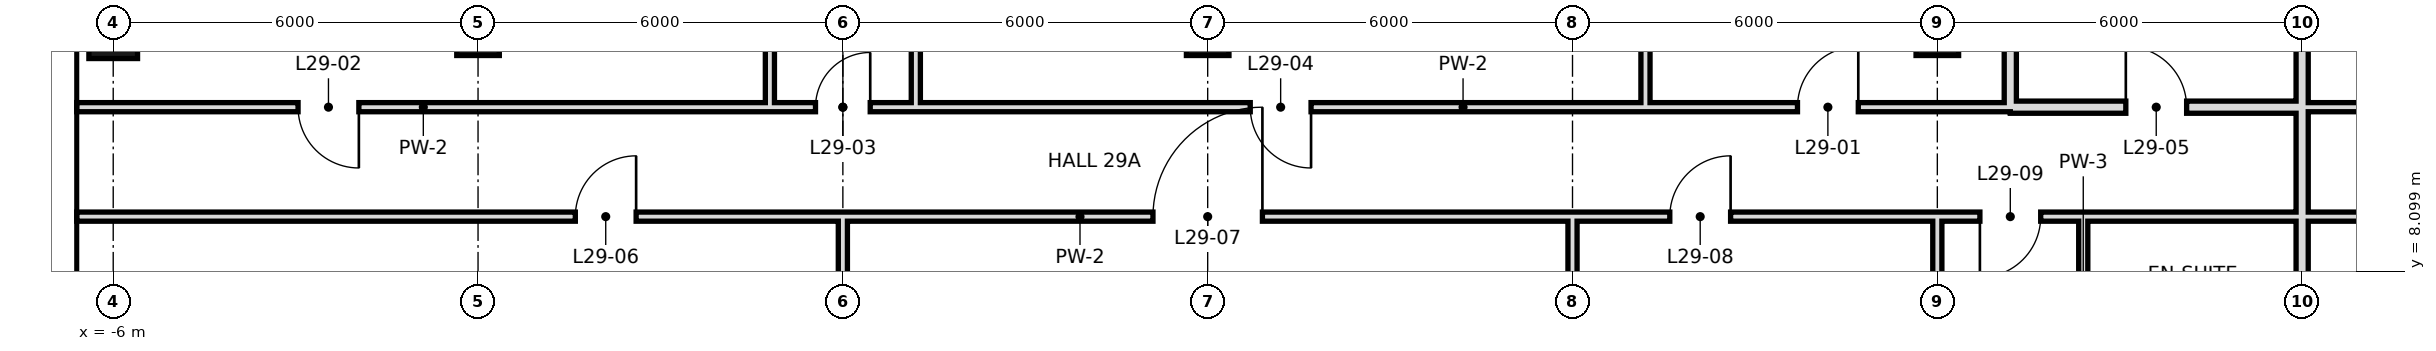
"""IFC4 building model, lengths in metres.
Left out: names, types, materials, properties, quantities, classifications, styles, units other than length and angle.
Written with IfcOpenShell. Run it as: python <this file> out.ifc"""

import sys

from ifc_helpers import new_model, si_unit, direction, frame, frame_2d, origin, origin_2d, place, context, subcontext, project, spatial, rectangle, hollow_rectangle, extrude, element, fill, save


model = new_model("IFC4")
c1 = context("Model", 3, precision=1e-05, world=origin(), true_north=direction((0.0, 1.0)))
c2 = subcontext(c1, "Body", "Model", "MODEL_VIEW")
j1 = project(units=[si_unit("LENGTHUNIT", "METRE"), si_unit("PLANEANGLEUNIT", "RADIAN")], contexts=[c1])
p1 = place(None, origin())
s1 = spatial("IfcSite", under=j1, at=p1, CompositionType="ELEMENT")
p2 = place(p1, origin())
s2 = spatial("IfcBuilding", under=s1, at=p2, CompositionType="ELEMENT")
p3 = place(p2, frame((0.0, 0.0, 130.4)))
s3 = spatial("IfcBuildingStorey", under=s2, at=p3, CompositionType="ELEMENT", Elevation=130.4)
p4 = place(p3, frame((-6.0, 12.0, 0.0), z_axis=(0.0, 0.0, 1.0), x_axis=(1.0, 0.0, 0.0)))
e1 = element("IfcColumn", 1, at=p4, inside=s3, PredefinedType="COLUMN", context=c2, shape_type="SweptSolid", body=[
    extrude(hollow_rectangle(XDim=0.8, YDim=0.8, WallThickness=0.04, at=origin_2d()), origin(), (0.0, 0.0, 1.0), 3.6),
])
for number, where, z_axis, x_axis in (
    (2, (0.0, 12.0, 0.0), (0.0, 0.0, 1.0), (1.0, 0.0, 0.0)),
    (3, (12.0, 12.0, 0.0), (0.0, 0.0, 1.0), (1.0, 0.0, 0.0)),
    (4, (24.0, 12.0, 0.0), (0.0, 0.0, 1.0), (1.0, 0.0, 0.0)),
):
    element("IfcColumn", number, at=place(p3, frame(where, z_axis=z_axis, x_axis=x_axis)), inside=s3, PredefinedType="COLUMN", context=c2, shape_type="SweptSolid", body=[
        extrude(hollow_rectangle(XDim=0.7, YDim=0.7, WallThickness=0.036, at=origin_2d()), origin(), (0.0, 0.0, 1.0), 3.6),
    ])
p5 = place(p3, frame((18.0, -0.6, 0.0), z_axis=(0.0, 0.0, 1.0), x_axis=(0.0, 1.0, 0.0)))
e5 = element("IfcWall", 5, at=p5, inside=s3, PredefinedType="PARTITIONING", context=c2, shape_type="SweptSolid", body=[
    extrude(rectangle(XDim=9.6, YDim=0.15, at=frame_2d((4.8, 0.0))), origin(), (0.0, 0.0, 1.0), 2.72),
])
p6 = place(p3, frame((19.2, 10.8, 0.0), z_axis=(0.0, 0.0, 1.0), x_axis=(0.0, 1.0, 0.0)))
e6 = element("IfcWall", 6, at=p6, inside=s3, PredefinedType="PARTITIONING", context=c2, shape_type="SweptSolid", body=[
    extrude(rectangle(XDim=7.9, YDim=0.15, at=frame_2d((3.95, 0.0))), origin(), (0.0, 0.0, 1.0), 3.42),
])
p7 = place(p3, frame((24.0, 0.0, 0.0), z_axis=(0.0, 0.0, 1.0), x_axis=(0.0, 1.0, 0.0)))
e7 = element("IfcWall", 7, at=p7, inside=s3, PredefinedType="PARTITIONING", context=c2, shape_type="SweptSolid", body=[
    extrude(rectangle(XDim=9.0, YDim=0.15, at=frame_2d((4.5, 0.0))), origin(), (0.0, 0.0, 1.0), 2.72),
])
p8 = place(p3, frame((25.2, 10.8, 0.0), z_axis=(0.0, 0.0, 1.0), x_axis=(0.0, 1.0, 0.0)))
e8 = element("IfcWall", 8, at=p8, inside=s3, PredefinedType="SOLIDWALL", context=c2, shape_type="SweptSolid", body=[
    extrude(rectangle(XDim=7.9, YDim=0.2, at=frame_2d((3.95, 0.0))), origin(), (0.0, 0.0, 1.0), 2.72),
])
p9 = place(p3, frame((26.4, 6.0, 0.0), z_axis=(0.0, 0.0, 1.0), x_axis=(0.0, 1.0, 0.0)))
e9 = element("IfcWall", 9, at=p9, inside=s3, PredefinedType="PARTITIONING", context=c2, shape_type="SweptSolid", body=[
    extrude(rectangle(XDim=3.0, YDim=0.15, at=frame_2d((1.5, 0.0))), origin(), (0.0, 0.0, 1.0), 3.42),
])
p10 = place(p3, frame((30.0, 10.8, 0.0), z_axis=(0.0, 0.0, 1.0), x_axis=(0.0, 1.0, 0.0)))
e10 = element("IfcWall", 10, at=p10, inside=s3, PredefinedType="SOLIDWALL", context=c2, shape_type="SweptSolid", body=[
    extrude(rectangle(XDim=7.9, YDim=0.2, at=frame_2d((3.95, 0.0))), origin(), (0.0, 0.0, 1.0), 2.72),
])
p11 = place(p3, frame((30.0, -0.6, 0.0), z_axis=(0.0, 0.0, 1.0), x_axis=(0.0, 1.0, 0.0)))
e11 = element("IfcWall", 11, at=p11, inside=s3, PredefinedType="SOLIDWALL", context=c2, shape_type="SweptSolid", body=[
    extrude(rectangle(XDim=11.4, YDim=0.2, at=frame_2d((5.7, 0.0))), origin(), (0.0, 0.0, 1.0), 2.72),
])
p12 = place(p3, frame((4.8, 10.8, 0.0), z_axis=(0.0, 0.0, 1.0), x_axis=(0.0, 1.0, 0.0)))
e12 = element("IfcWall", 12, at=p12, inside=s3, PredefinedType="PARTITIONING", context=c2, shape_type="SweptSolid", body=[
    extrude(rectangle(XDim=7.9, YDim=0.15, at=frame_2d((3.95, 0.0))), origin(), (0.0, 0.0, 1.0), 3.42),
])
p13 = place(p3, frame((6.0, -0.6, 0.0), z_axis=(0.0, 0.0, 1.0), x_axis=(0.0, 1.0, 0.0)))
e13 = element("IfcWall", 13, at=p13, inside=s3, PredefinedType="PARTITIONING", context=c2, shape_type="SweptSolid", body=[
    extrude(rectangle(XDim=9.6, YDim=0.15, at=frame_2d((4.8, 0.0))), origin(), (0.0, 0.0, 1.0), 2.72),
])
p14 = place(p3, frame((7.2, 10.8, 0.0), z_axis=(0.0, 0.0, 1.0), x_axis=(0.0, 1.0, 0.0)))
e14 = element("IfcWall", 14, at=p14, inside=s3, PredefinedType="PARTITIONING", context=c2, shape_type="SweptSolid", body=[
    extrude(rectangle(XDim=7.9, YDim=0.15, at=frame_2d((3.95, 0.0))), origin(), (0.0, 0.0, 1.0), 3.42),
])
p15 = place(p3, frame((25.2, 10.8, 0.0), z_axis=(0.0, 0.0, 1.0), x_axis=(1.0, 0.0, 0.0)))
e15 = element("IfcWall", 15, at=p15, inside=s3, PredefinedType="SOLIDWALL", context=c2, shape_type="SweptSolid", body=[
    extrude(rectangle(XDim=4.8, YDim=0.2, at=frame_2d((2.4, 0.0))), origin(), (0.0, 0.0, 1.0), 2.72),
])
p16 = place(p15, frame((1.9, 0.0, 0.0)))
e16 = element("IfcOpeningElement", 16, at=p16, cuts=e15, PredefinedType="OPENING", context=c2, shape_type="SweptSolid", body=[
    extrude(rectangle(XDim=1.0, YDim=2.4, at=frame_2d((0.5, 1.2))), frame((0.0, 0.11, 0.0), z_axis=(0.0, -1.0, 0.0), x_axis=(1.0, 0.0, 0.0)), (0.0, 0.0, 1.0), 0.22),
])
p17 = place(p3, frame((-6.6, 10.8, 0.0), z_axis=(0.0, 0.0, 1.0), x_axis=(1.0, 0.0, 0.0)))
e17 = element("IfcWall", 17, at=p17, inside=s3, PredefinedType="PARTITIONING", context=c2, shape_type="SweptSolid", body=[
    extrude(rectangle(XDim=11.4, YDim=0.15, at=frame_2d((5.7, 0.0))), origin(), (0.0, 0.0, 1.0), 3.42),
])
p18 = place(p17, frame((3.64, 0.0, 0.0)))
e18 = element("IfcOpeningElement", 18, at=p18, cuts=e17, PredefinedType="OPENING", context=c2, shape_type="SweptSolid", body=[
    extrude(rectangle(XDim=1.0, YDim=2.4, at=frame_2d((0.5, 1.2))), frame((0.0, 0.085, 0.0), z_axis=(0.0, -1.0, 0.0), x_axis=(1.0, 0.0, 0.0)), (0.0, 0.0, 1.0), 0.17),
])
p19 = place(p3, frame((7.2, 10.8, 0.0), z_axis=(0.0, 0.0, 1.0), x_axis=(1.0, 0.0, 0.0)))
e19 = element("IfcWall", 19, at=p19, inside=s3, PredefinedType="PARTITIONING", context=c2, shape_type="SweptSolid", body=[
    extrude(rectangle(XDim=18.0, YDim=0.15, at=frame_2d((9.0, 0.0))), origin(), (0.0, 0.0, 1.0), 3.42),
])
p20 = place(p19, frame((14.5, 0.0, 0.0)))
e20 = element("IfcOpeningElement", 20, at=p20, cuts=e19, PredefinedType="OPENING", context=c2, shape_type="SweptSolid", body=[
    extrude(rectangle(XDim=1.0, YDim=2.4, at=frame_2d((0.5, 1.2))), frame((0.0, 0.085, 0.0), z_axis=(0.0, -1.0, 0.0), x_axis=(1.0, 0.0, 0.0)), (0.0, 0.0, 1.0), 0.17),
])
p21 = place(p19, frame((5.5, 0.0, 0.0)))
e21 = element("IfcOpeningElement", 21, at=p21, cuts=e19, PredefinedType="OPENING", context=c2, shape_type="SweptSolid", body=[
    extrude(rectangle(XDim=1.0, YDim=2.4, at=frame_2d((0.5, 1.2))), frame((0.0, 0.085, 0.0), z_axis=(0.0, -1.0, 0.0), x_axis=(1.0, 0.0, 0.0)), (0.0, 0.0, 1.0), 0.17),
])
p22 = place(p3, frame((30.0, 10.8, 0.0), z_axis=(0.0, 0.0, 1.0), x_axis=(1.0, 0.0, 0.0)))
e22 = element("IfcWall", 22, at=p22, inside=s3, PredefinedType="PARTITIONING", context=c2, shape_type="SweptSolid", body=[
    extrude(rectangle(XDim=11.4, YDim=0.15, at=frame_2d((5.7, 0.0))), origin(), (0.0, 0.0, 1.0), 3.42),
])
p23 = place(p22, frame((9.1, 0.0, 0.0)))
e23 = element("IfcOpeningElement", 23, at=p23, cuts=e22, PredefinedType="OPENING", context=c2, shape_type="SweptSolid", body=[
    extrude(rectangle(XDim=1.0, YDim=2.4, at=frame_2d((0.5, 1.2))), frame((0.0, 0.085, 0.0), z_axis=(0.0, -1.0, 0.0), x_axis=(1.0, 0.0, 0.0)), (0.0, 0.0, 1.0), 0.17),
])
p24 = place(p22, frame((3.4, 0.0, 0.0)))
e24 = element("IfcOpeningElement", 24, at=p24, cuts=e22, PredefinedType="OPENING", context=c2, shape_type="SweptSolid", body=[
    extrude(rectangle(XDim=1.0, YDim=2.4, at=frame_2d((0.5, 1.2))), frame((0.0, 0.085, 0.0), z_axis=(0.0, -1.0, 0.0), x_axis=(1.0, 0.0, 0.0)), (0.0, 0.0, 1.0), 0.17),
])
p25 = place(p3, frame((4.8, 10.8, 0.0), z_axis=(0.0, 0.0, 1.0), x_axis=(1.0, 0.0, 0.0)))
e25 = element("IfcWall", 25, at=p25, inside=s3, PredefinedType="PARTITIONING", context=c2, shape_type="SweptSolid", body=[
    extrude(rectangle(XDim=2.4, YDim=0.15, at=frame_2d((1.2, 0.0))), origin(), (0.0, 0.0, 1.0), 3.42),
])
p26 = place(p25, frame((0.75, 0.0, 0.0)))
e26 = element("IfcOpeningElement", 26, at=p26, cuts=e25, PredefinedType="OPENING", context=c2, shape_type="SweptSolid", body=[
    extrude(rectangle(XDim=0.9, YDim=2.4, at=frame_2d((0.45, 1.2))), frame((0.0, 0.085, 0.0), z_axis=(0.0, -1.0, 0.0), x_axis=(1.0, 0.0, 0.0)), (0.0, 0.0, 1.0), 0.17),
])
p27 = place(p3, frame((-6.6, 9.0, 0.0), z_axis=(0.0, 0.0, 1.0), x_axis=(1.0, 0.0, 0.0)))
e27 = element("IfcWall", 27, at=p27, inside=s3, PredefinedType="PARTITIONING", context=c2, shape_type="SweptSolid", body=[
    extrude(rectangle(XDim=33.0, YDim=0.15, at=frame_2d((16.5, 0.0))), origin(), (0.0, 0.0, 1.0), 3.42),
])
p28 = place(p27, frame((8.2, 0.0, 0.0)))
e28 = element("IfcOpeningElement", 28, at=p28, cuts=e27, PredefinedType="OPENING", context=c2, shape_type="SweptSolid", body=[
    extrude(rectangle(XDim=1.0, YDim=2.4, at=frame_2d((0.5, 1.2))), frame((0.0, 0.085, 0.0), z_axis=(0.0, -1.0, 0.0), x_axis=(1.0, 0.0, 0.0)), (0.0, 0.0, 1.0), 0.17),
])
p29 = place(p27, frame((17.7, 0.0, 0.0)))
e29 = element("IfcOpeningElement", 29, at=p29, cuts=e27, PredefinedType="OPENING", context=c2, shape_type="SweptSolid", body=[
    extrude(rectangle(XDim=1.8, YDim=2.4, at=frame_2d((0.9, 1.2))), frame((0.0, 0.085, 0.0), z_axis=(0.0, -1.0, 0.0), x_axis=(1.0, 0.0, 0.0)), (0.0, 0.0, 1.0), 0.17),
])
p30 = place(p27, frame((26.2, 0.0, 0.0)))
e30 = element("IfcOpeningElement", 30, at=p30, cuts=e27, PredefinedType="OPENING", context=c2, shape_type="SweptSolid", body=[
    extrude(rectangle(XDim=1.0, YDim=2.4, at=frame_2d((0.5, 1.2))), frame((0.0, 0.085, 0.0), z_axis=(0.0, -1.0, 0.0), x_axis=(1.0, 0.0, 0.0)), (0.0, 0.0, 1.0), 0.17),
])
p31 = place(p27, frame((31.3, 0.0, 0.0)))
e31 = element("IfcOpeningElement", 31, at=p31, cuts=e27, PredefinedType="OPENING", context=c2, shape_type="SweptSolid", body=[
    extrude(rectangle(XDim=1.0, YDim=2.4, at=frame_2d((0.5, 1.2))), frame((0.0, 0.085, 0.0), z_axis=(0.0, -1.0, 0.0), x_axis=(1.0, 0.0, 0.0)), (0.0, 0.0, 1.0), 0.17),
])
p32 = place(p3, frame((30.0, 9.0, 0.0), z_axis=(0.0, 0.0, 1.0), x_axis=(1.0, 0.0, 0.0)))
e32 = element("IfcWall", 32, at=p32, inside=s3, PredefinedType="PARTITIONING", context=c2, shape_type="SweptSolid", body=[
    extrude(rectangle(XDim=18.0, YDim=0.15, at=frame_2d((9.0, 0.0))), origin(), (0.0, 0.0, 1.0), 3.42),
])
p33 = place(p32, frame((7.04, 0.0, 0.0)))
e33 = element("IfcOpeningElement", 33, at=p33, cuts=e32, PredefinedType="OPENING", context=c2, shape_type="SweptSolid", body=[
    extrude(rectangle(XDim=1.8, YDim=2.4, at=frame_2d((0.9, 1.2))), frame((0.0, 0.085, 0.0), z_axis=(0.0, -1.0, 0.0), x_axis=(1.0, 0.0, 0.0)), (0.0, 0.0, 1.0), 0.17),
])
p34 = place(p32, frame((15.4, 0.0, 0.0)))
e34 = element("IfcOpeningElement", 34, at=p34, cuts=e32, PredefinedType="OPENING", context=c2, shape_type="SweptSolid", body=[
    extrude(rectangle(XDim=1.0, YDim=2.4, at=frame_2d((0.5, 1.2))), frame((0.0, 0.085, 0.0), z_axis=(0.0, -1.0, 0.0), x_axis=(1.0, 0.0, 0.0)), (0.0, 0.0, 1.0), 0.17),
])
p35 = place(p3, frame((26.4, 9.0, 0.0), z_axis=(0.0, 0.0, 1.0), x_axis=(1.0, 0.0, 0.0)))
e35 = element("IfcWall", 35, at=p35, inside=s3, PredefinedType="PARTITIONING", context=c2, shape_type="SweptSolid", body=[
    extrude(rectangle(XDim=3.6, YDim=0.15, at=frame_2d((1.8, 0.0))), origin(), (0.0, 0.0, 1.0), 3.42),
])
p36 = place(p20, frame((1.0, 0.0, 0.0), z_axis=(0.0, 0.0, 1.0), x_axis=(-1.0, 0.0, 0.0)))
e36 = element("IfcDoor", 36, at=p36, inside=s3, OperationType="SINGLE_SWING_LEFT", PredefinedType="DOOR", context=c2, shape_type="SweptSolid", body=[
    extrude(rectangle(XDim=1.0, YDim=2.4, at=frame_2d((0.5, 1.2))), frame((0.0, 0.025, 0.0), z_axis=(0.0, -1.0, 0.0), x_axis=(1.0, 0.0, 0.0)), (0.0, 0.0, 1.0), 0.05),
])
fill(e20, e36)
p37 = place(p18, origin())
e37 = element("IfcDoor", 37, at=p37, inside=s3, OperationType="SINGLE_SWING_RIGHT", PredefinedType="DOOR", context=c2, shape_type="SweptSolid", body=[
    extrude(rectangle(XDim=1.0, YDim=2.4, at=frame_2d((0.5, 1.2))), frame((0.0, 0.025, 0.0), z_axis=(0.0, -1.0, 0.0), x_axis=(1.0, 0.0, 0.0)), (0.0, 0.0, 1.0), 0.05),
])
fill(e18, e37)
p38 = place(p26, frame((0.9, 0.0, 0.0), z_axis=(0.0, 0.0, 1.0), x_axis=(-1.0, 0.0, 0.0)))
e38 = element("IfcDoor", 38, at=p38, inside=s3, OperationType="SINGLE_SWING_LEFT", PredefinedType="DOOR", context=c2, shape_type="SweptSolid", body=[
    extrude(rectangle(XDim=0.9, YDim=2.4, at=frame_2d((0.45, 1.2))), frame((0.0, 0.025, 0.0), z_axis=(0.0, -1.0, 0.0), x_axis=(1.0, 0.0, 0.0)), (0.0, 0.0, 1.0), 0.05),
])
fill(e26, e38)
p39 = place(p21, origin())
e39 = element("IfcDoor", 39, at=p39, inside=s3, OperationType="SINGLE_SWING_RIGHT", PredefinedType="DOOR", context=c2, shape_type="SweptSolid", body=[
    extrude(rectangle(XDim=1.0, YDim=2.4, at=frame_2d((0.5, 1.2))), frame((0.0, 0.025, 0.0), z_axis=(0.0, -1.0, 0.0), x_axis=(1.0, 0.0, 0.0)), (0.0, 0.0, 1.0), 0.05),
])
fill(e21, e39)
p40 = place(p16, origin())
e40 = element("IfcDoor", 40, at=p40, inside=s3, OperationType="SINGLE_SWING_LEFT", PredefinedType="DOOR", context=c2, shape_type="SweptSolid", body=[
    extrude(rectangle(XDim=1.0, YDim=2.4, at=frame_2d((0.5, 1.2))), frame((0.0, 0.025, 0.0), z_axis=(0.0, -1.0, 0.0), x_axis=(1.0, 0.0, 0.0)), (0.0, 0.0, 1.0), 0.05),
])
fill(e16, e40)
p41 = place(p28, frame((1.0, 0.0, 0.0), z_axis=(0.0, 0.0, 1.0), x_axis=(-1.0, 0.0, 0.0)))
e41 = element("IfcDoor", 41, at=p41, inside=s3, OperationType="SINGLE_SWING_LEFT", PredefinedType="DOOR", context=c2, shape_type="SweptSolid", body=[
    extrude(rectangle(XDim=1.0, YDim=2.4, at=frame_2d((0.5, 1.2))), frame((0.0, 0.025, 0.0), z_axis=(0.0, -1.0, 0.0), x_axis=(1.0, 0.0, 0.0)), (0.0, 0.0, 1.0), 0.05),
])
fill(e28, e41)
p42 = place(p29, frame((1.8, 0.0, 0.0), z_axis=(0.0, 0.0, 1.0), x_axis=(-1.0, 0.0, 0.0)))
e42 = element("IfcDoor", 42, at=p42, inside=s3, OperationType="SINGLE_SWING_LEFT", PredefinedType="DOOR", context=c2, shape_type="SweptSolid", body=[
    extrude(rectangle(XDim=1.8, YDim=2.4, at=frame_2d((0.9, 1.2))), frame((0.0, 0.025, 0.0), z_axis=(0.0, -1.0, 0.0), x_axis=(1.0, 0.0, 0.0)), (0.0, 0.0, 1.0), 0.05),
])
fill(e29, e42)
p43 = place(p30, frame((1.0, 0.0, 0.0), z_axis=(0.0, 0.0, 1.0), x_axis=(-1.0, 0.0, 0.0)))
e43 = element("IfcDoor", 43, at=p43, inside=s3, OperationType="SINGLE_SWING_LEFT", PredefinedType="DOOR", context=c2, shape_type="SweptSolid", body=[
    extrude(rectangle(XDim=1.0, YDim=2.4, at=frame_2d((0.5, 1.2))), frame((0.0, 0.025, 0.0), z_axis=(0.0, -1.0, 0.0), x_axis=(1.0, 0.0, 0.0)), (0.0, 0.0, 1.0), 0.05),
])
fill(e30, e43)
p44 = place(p31, frame((1.0, 0.0, 0.0), z_axis=(0.0, 0.0, 1.0), x_axis=(-1.0, 0.0, 0.0)))
e44 = element("IfcDoor", 44, at=p44, inside=s3, OperationType="SINGLE_SWING_RIGHT", PredefinedType="DOOR", context=c2, shape_type="SweptSolid", body=[
    extrude(rectangle(XDim=1.0, YDim=2.4, at=frame_2d((0.5, 1.2))), frame((0.0, 0.025, 0.0), z_axis=(0.0, -1.0, 0.0), x_axis=(1.0, 0.0, 0.0)), (0.0, 0.0, 1.0), 0.05),
])
fill(e31, e44)
save(model, sys.argv[1])
